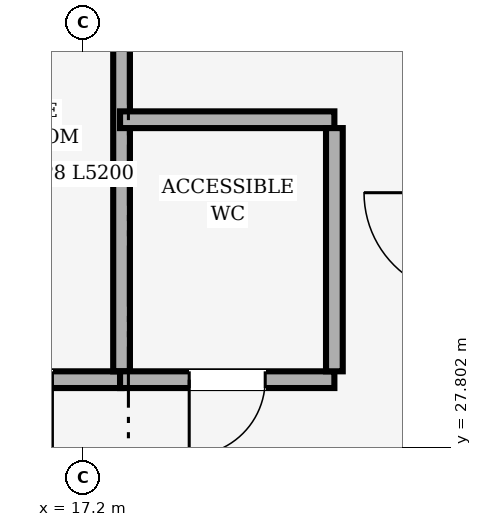
"""IFC4 building model, lengths in metres.
Left out: names, types, materials, properties, quantities, classifications, styles, units other than length and angle.
Written with IfcOpenShell. Run it as: python <this file> out.ifc"""

import sys

from ifc_helpers import new_model, si_unit, direction, frame, frame_2d, origin, place, context, subcontext, project, spatial, rectangle, extrude, element, fill, save


model = new_model("IFC4")
c1 = context("Model", 3, precision=1e-05, world=origin(), true_north=direction((0.0, 1.0)))
c2 = subcontext(c1, "Body", "Model", "MODEL_VIEW")
j1 = project(units=[si_unit("LENGTHUNIT", "METRE"), si_unit("PLANEANGLEUNIT", "RADIAN")], contexts=[c1])
p1 = place(None, origin())
s1 = spatial("IfcSite", under=j1, at=p1, CompositionType="ELEMENT")
p2 = place(p1, origin())
s2 = spatial("IfcBuilding", under=s1, at=p2, CompositionType="ELEMENT")
p3 = place(p2, frame((0.0, 0.0, 4.5)))
s3 = spatial("IfcBuildingStorey", under=s2, at=p3, CompositionType="ELEMENT", Elevation=4.5)
p4 = place(p3, frame((17.71, 28.69, 0.0), z_axis=(0.0, 0.0, 1.0), x_axis=(-1.0, 0.0, 0.0)))
e1 = element("IfcWall", 1, at=p4, inside=s3, PredefinedType="PLUMBINGWALL", context=c2, shape_type="SweptSolid", body=[
    extrude(rectangle(XDim=2.82, YDim=0.22, at=frame_2d((1.41, 0.0))), origin(), (0.0, 0.0, 1.0), 3.63),
])
p5 = place(p4, frame((0.91, 0.0, 0.0)))
e2 = element("IfcOpeningElement", 2, at=p5, cuts=e1, PredefinedType="OPENING", context=c2, shape_type="SweptSolid", body=[
    extrude(rectangle(XDim=1.0, YDim=2.1, at=frame_2d((0.5, 1.05))), frame((0.0, 0.11, 0.0), z_axis=(0.0, -1.0, 0.0), x_axis=(1.0, 0.0, 0.0)), (0.0, 0.0, 1.0), 0.22),
])
p6 = place(p3, frame((17.71, 34.0, 0.0), z_axis=(0.0, 0.0, 1.0), x_axis=(0.0, -1.0, 0.0)))
e3 = element("IfcWall", 3, at=p6, inside=s3, PredefinedType="PLUMBINGWALL", context=c2, shape_type="SweptSolid", body=[
    extrude(rectangle(XDim=5.2, YDim=0.22, at=frame_2d((2.6, 0.0))), origin(), (0.0, 0.0, 1.0), 3.63),
])
p7 = place(p3, frame((20.51, 28.69, 0.0), z_axis=(0.0, 0.0, 1.0), x_axis=(-1.0, 0.0, 0.0)))
e4 = element("IfcWall", 4, at=p7, inside=s3, PredefinedType="PLUMBINGWALL", context=c2, shape_type="SweptSolid", body=[
    extrude(rectangle(XDim=2.82, YDim=0.22, at=frame_2d((1.41, 0.0))), origin(), (0.0, 0.0, 1.0), 3.63),
])
p8 = place(p7, frame((0.91, 0.0, 0.0)))
e5 = element("IfcOpeningElement", 5, at=p8, cuts=e4, PredefinedType="OPENING", context=c2, shape_type="SweptSolid", body=[
    extrude(rectangle(XDim=1.0, YDim=2.1, at=frame_2d((0.5, 1.05))), frame((0.0, 0.11, 0.0), z_axis=(0.0, -1.0, 0.0), x_axis=(1.0, 0.0, 0.0)), (0.0, 0.0, 1.0), 0.22),
])
p9 = place(p3, frame((17.69, 32.11, 0.0), z_axis=(0.0, 0.0, 1.0), x_axis=(1.0, 0.0, 0.0)))
e6 = element("IfcWall", 6, at=p9, inside=s3, PredefinedType="PLUMBINGWALL", context=c2, shape_type="SweptSolid", body=[
    extrude(rectangle(XDim=2.82, YDim=0.22, at=frame_2d((1.41, 0.0))), origin(), (0.0, 0.0, 1.0), 3.63),
])
p10 = place(p3, frame((20.51, 32.0, 0.0), z_axis=(0.0, 0.0, 1.0), x_axis=(0.0, -1.0, 0.0)))
e7 = element("IfcWall", 7, at=p10, inside=s3, PredefinedType="PLUMBINGWALL", context=c2, shape_type="SweptSolid", body=[
    extrude(rectangle(XDim=3.2, YDim=0.22, at=frame_2d((1.6, 0.0))), origin(), (0.0, 0.0, 1.0), 3.63),
])
p11 = place(p8, origin())
e8 = element("IfcDoor", 8, at=p11, inside=s3, OperationType="SINGLE_SWING_RIGHT", PredefinedType="DOOR", context=c2, shape_type="SweptSolid", body=[
    extrude(rectangle(XDim=1.0, YDim=2.1, at=frame_2d((0.5, 1.05))), frame((0.0, 0.025, 0.0), z_axis=(0.0, -1.0, 0.0), x_axis=(1.0, 0.0, 0.0)), (0.0, 0.0, 1.0), 0.05),
])
fill(e5, e8)
save(model, sys.argv[1])
